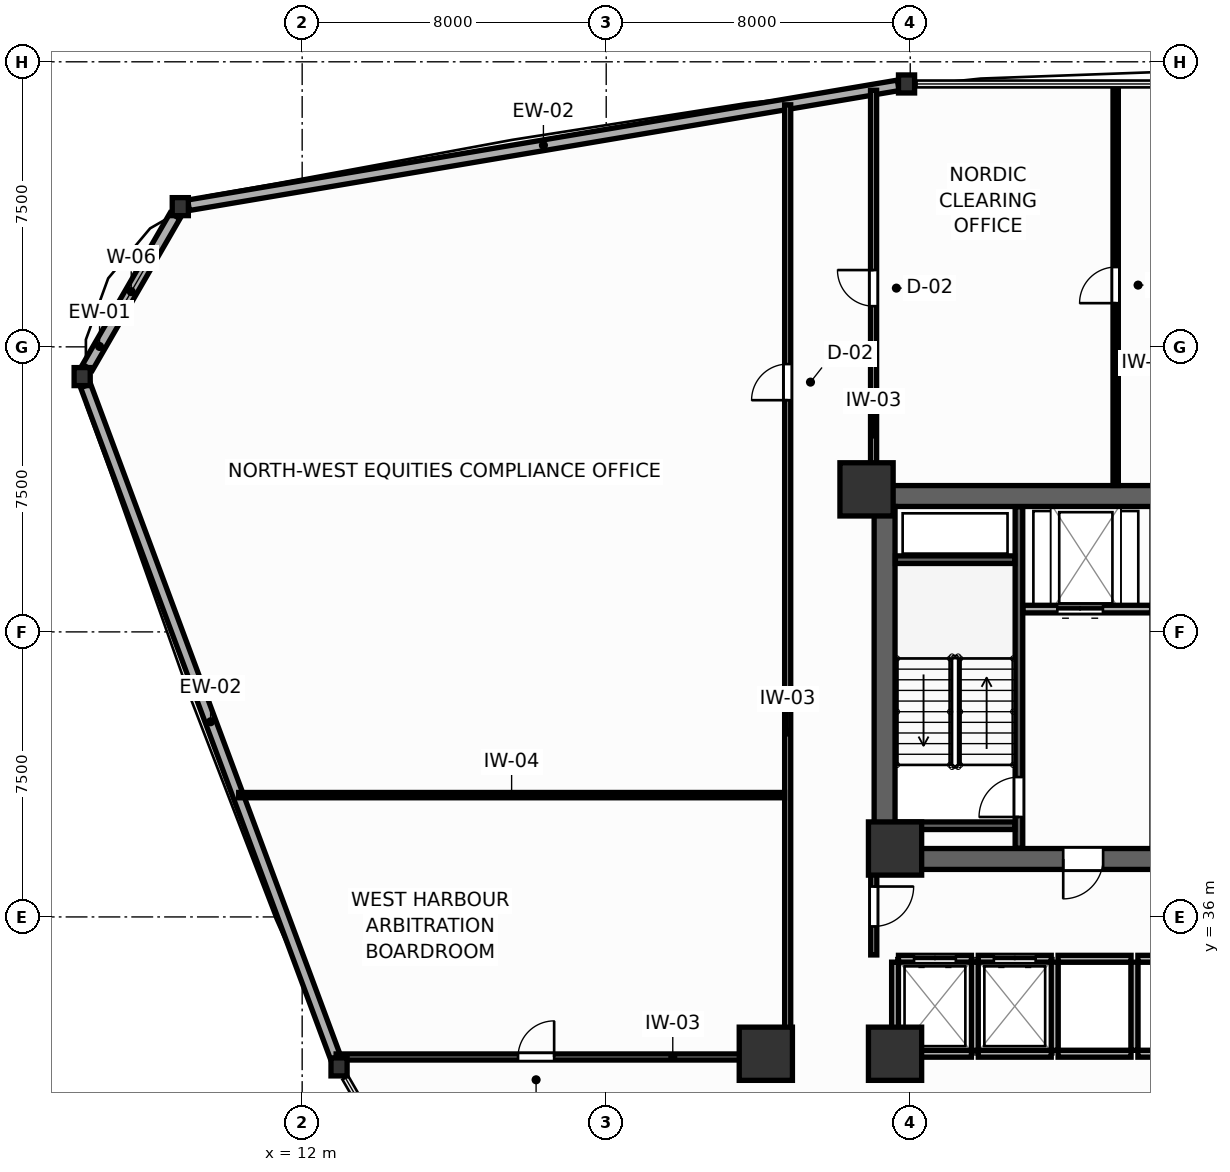
"""IFC4 building model, lengths in metres.
Left out: names, types, materials, properties, quantities, classifications, styles, units other than length and angle.
Written with IfcOpenShell. Run it as: python <this file> out.ifc"""

import sys

from ifc_helpers import new_model, si_unit, direction, frame, frame_2d, origin, origin_2d, place, context, subcontext, project, spatial, rectangle, i_section, extrude, source, transform, mapped, element, fill, save


model = new_model("IFC4")
c1 = context("Model", 3, precision=1e-05, world=origin(), true_north=direction((0.0, 1.0)))
c2 = subcontext(c1, "Body", "Model", "MODEL_VIEW")
j1 = project(units=[si_unit("LENGTHUNIT", "METRE"), si_unit("PLANEANGLEUNIT", "RADIAN")], contexts=[c1])
p1 = place(None, origin())
s1 = spatial("IfcSite", under=j1, at=p1, CompositionType="ELEMENT")
p2 = place(p1, origin())
s2 = spatial("IfcBuilding", under=s1, at=p2, CompositionType="ELEMENT")
p3 = place(p2, frame((0.0, 0.0, 31.8)))
s3 = spatial("IfcBuildingStorey", under=s2, at=p3, CompositionType="ELEMENT", Elevation=31.8)
p4 = place(p3, frame((27.05, 47.075, 0.0), z_axis=(0.0, 0.0, 1.0), x_axis=(1.0, 0.0, 0.0)))
e1 = element("IfcWall", 1, at=p4, inside=s3, PredefinedType="SHEAR", context=c2, shape_type="SweptSolid", body=[
    extrude(rectangle(XDim=17.9, YDim=0.55, at=frame_2d((8.95, 0.0))), origin(), (0.0, 0.0, 1.0), 3.9),
])
p5 = place(p3, frame((27.05, 37.525, 0.0), z_axis=(0.0, 0.0, 1.0), x_axis=(1.0, 0.0, 0.0)))
e2 = element("IfcWall", 2, at=p5, inside=s3, PredefinedType="SHEAR", context=c2, shape_type="SweptSolid", body=[
    extrude(rectangle(XDim=17.9, YDim=0.55, at=frame_2d((8.95, 0.0))), origin(), (0.0, 0.0, 1.0), 3.9),
])
p6 = place(p5, frame((4.975, 0.0, 0.0)))
e3 = element("IfcOpeningElement", 3, at=p6, cuts=e2, PredefinedType="OPENING", context=c2, shape_type="SweptSolid", body=[
    extrude(rectangle(XDim=1.05, YDim=2.1, at=frame_2d((0.525, 1.05))), frame((0.0, 0.285, 0.0), z_axis=(0.0, -1.0, 0.0), x_axis=(1.0, 0.0, 0.0)), (0.0, 0.0, 1.0), 0.57),
])
p7 = place(p5, frame((11.875, 0.0, 0.0)))
e4 = element("IfcOpeningElement", 4, at=p7, cuts=e2, PredefinedType="OPENING", context=c2, shape_type="SweptSolid", body=[
    extrude(rectangle(XDim=1.05, YDim=2.1, at=frame_2d((0.525, 1.05))), frame((0.0, 0.285, 0.0), z_axis=(0.0, -1.0, 0.0), x_axis=(1.0, 0.0, 0.0)), (0.0, 0.0, 1.0), 0.57),
])
p8 = place(p3, frame((27.325, 37.8, 0.0), z_axis=(0.0, 0.0, 1.0), x_axis=(0.0, 1.0, 0.0)))
e5 = element("IfcWall", 5, at=p8, inside=s3, PredefinedType="SHEAR", context=c2, shape_type="SweptSolid", body=[
    extrude(rectangle(XDim=9.0, YDim=0.55, at=frame_2d((4.5, 0.0))), origin(), (0.0, 0.0, 1.0), 3.9),
])
m1 = source(origin(), c2, "Body", "SweptSolid", [
    extrude(rectangle(XDim=1.4, YDim=1.4, at=origin_2d()), origin(), (0.0, 0.0, 1.0), 3.9),
])
for number, where, z_axis, x_axis in (
    (6, (26.85, 47.25, 0.0), (0.0, 0.0, 1.0), (1.0, 0.0, 0.0)),
    (7, (27.6, 37.8, 0.0), (0.0, 0.0, 1.0), (1.0, 0.0, 0.0)),
    (8, (27.6, 32.4, 0.0), (0.0, 0.0, 1.0), (1.0, 0.0, 0.0)),
    (9, (24.2, 32.4, 0.0), (0.0, 0.0, 1.0), (1.0, 0.0, 0.0)),
):
    element("IfcColumn", number, at=place(p3, frame(where, z_axis=z_axis, x_axis=x_axis)), inside=s3, PredefinedType="COLUMN", context=c2, shape_type="MappedRepresentation", body=[
        mapped(m1, transform((0.0, 0.0, 0.0), scale=1.0)),
    ])
m2 = source(origin(), c2, "Body", "SweptSolid", [
    extrude(i_section(OverallWidth=0.424, OverallDepth=0.474, WebThickness=0.045, FlangeThickness=0.072, FilletRadius=0.015, at=origin_2d()), origin(), (0.0, 0.0, 1.0), 3.9),
])
for number, where, z_axis, x_axis in (
    (10, (27.903, 57.917, 0.0), (0.0, 0.0, 1.0), (1.0, 0.0, 0.0)),
    (11, (8.793, 54.689, 0.0), (0.0, 0.0, 1.0), (1.0, 0.0, 0.0)),
    (12, (6.211, 50.217, 0.0), (0.0, 0.0, 1.0), (1.0, 0.0, 0.0)),
    (13, (12.97, 32.054, 0.0), (0.0, 0.0, 1.0), (1.0, 0.0, 0.0)),
):
    element("IfcColumn", number, at=place(p3, frame(where, z_axis=z_axis, x_axis=x_axis)), inside=s3, PredefinedType="COLUMN", context=c2, shape_type="MappedRepresentation", body=[
        mapped(m2, transform((0.0, 0.0, 0.0), scale=1.0)),
    ])
p9 = place(p3, frame((27.686, 57.88, 0.0), z_axis=(0.0, 0.0, 1.0), x_axis=(-0.98603202958, -0.166555806393, 0.0)))
e14 = element("IfcWall", 14, at=p9, inside=s3, PredefinedType="SOLIDWALL", context=c2, shape_type="SweptSolid", body=[
    extrude(rectangle(XDim=18.94, YDim=0.28, at=frame_2d((9.47, 0.0))), origin(), (0.0, 0.0, 1.0), 2.08),
])
p10 = place(p3, frame((8.654, 54.447, 0.0), z_axis=(0.0, 0.0, 1.0), x_axis=(-0.500022295776, -0.86601253093, 0.0)))
e15 = element("IfcWall", 15, at=p10, inside=s3, PredefinedType="SOLIDWALL", context=c2, shape_type="SweptSolid", body=[
    extrude(rectangle(XDim=4.605, YDim=0.3, at=frame_2d((2.302, 0.0))), origin(), (0.0, 0.0, 1.0), 2.08),
])
p11 = place(p10, frame((1.452, 0.0, 0.75)))
e16 = element("IfcOpeningElement", 16, at=p11, cuts=e15, PredefinedType="OPENING", context=c2, shape_type="SweptSolid", body=[
    extrude(rectangle(XDim=1.7, YDim=1.15, at=frame_2d((0.85, 0.575))), frame((0.0, 0.16, 0.0), z_axis=(0.0, -1.0, 0.0), x_axis=(1.0, 0.0, 0.0)), (0.0, 0.0, 1.0), 0.32),
])
p12 = place(p3, frame((6.302, 49.975, 0.0), z_axis=(0.0, 0.0, 1.0), x_axis=(0.348763587367, -0.937210734108, 0.0)))
e17 = element("IfcWall", 17, at=p12, inside=s3, PredefinedType="SOLIDWALL", context=c2, shape_type="SweptSolid", body=[
    extrude(rectangle(XDim=18.863, YDim=0.28, at=frame_2d((9.432, 0.0))), origin(), (0.0, 0.0, 1.0), 2.08),
])
p13 = place(p3, frame((30.86, 37.81, 0.0), z_axis=(0.0, 0.0, 1.0), x_axis=(0.0, 1.0, 0.0)))
e18 = element("IfcWall", 18, at=p13, inside=s3, PredefinedType="SHEAR", context=c2, shape_type="SweptSolid", body=[
    extrude(rectangle(XDim=8.98, YDim=0.2, at=frame_2d((4.49, 0.0))), origin(), (0.0, 0.0, 1.0), 3.9),
])
p14 = place(p13, frame((0.82, 0.0, 0.0)))
e19 = element("IfcOpeningElement", 19, at=p14, cuts=e18, PredefinedType="OPENING", context=c2, shape_type="SweptSolid", body=[
    extrude(rectangle(XDim=1.05, YDim=2.1, at=frame_2d((0.525, 1.05))), frame((0.0, 0.11, 0.0), z_axis=(0.0, -1.0, 0.0), x_axis=(1.0, 0.0, 0.0)), (0.0, 0.0, 1.0), 0.22),
])
for number, where, z_axis, x_axis in (
    (20, (27.61, 45.4, 0.0), (0.0, 0.0, 1.0), (1.0, 0.0, 0.0)),
    (21, (27.61, 38.4, 0.0), (0.0, 0.0, 1.0), (1.0, 0.0, 0.0)),
):
    element("IfcWall", number, at=place(p3, frame(where, z_axis=z_axis, x_axis=x_axis)), inside=s3, PredefinedType="SHEAR", context=c2, shape_type="SweptSolid", body=[
        extrude(rectangle(XDim=3.14, YDim=0.2, at=frame_2d((1.57, 0.0))), origin(), (0.0, 0.0, 1.0), 3.9),
    ])
p15 = place(p3, frame((30.97, 44.1, 0.0), z_axis=(0.0, 0.0, 1.0), x_axis=(1.0, 0.0, 0.0)))
e22 = element("IfcWall", 22, at=p15, inside=s3, PredefinedType="PARTITIONING", context=c2, shape_type="SweptSolid", body=[
    extrude(rectangle(XDim=3.38, YDim=0.2, at=frame_2d((1.69, 0.0))), origin(), (0.0, 0.0, 1.0), 3.68),
])
p16 = place(p15, frame((0.9, 0.0, 0.0)))
e23 = element("IfcOpeningElement", 23, at=p16, cuts=e22, PredefinedType="OPENING", context=c2, shape_type="SweptSolid", body=[
    extrude(rectangle(XDim=1.2, YDim=2.1, at=frame_2d((0.6, 1.05))), frame((0.0, 0.11, 0.0), z_axis=(0.0, -1.0, 0.0), x_axis=(1.0, 0.0, 0.0)), (0.0, 0.0, 1.0), 0.22),
])
p17 = place(p3, frame((27.69, 34.9, 0.0), z_axis=(0.0, 0.0, 1.0), x_axis=(1.0, 0.0, 0.0)))
e24 = element("IfcWall", 24, at=p17, inside=s3, PredefinedType="PARTITIONING", context=c2, shape_type="SweptSolid", body=[
    extrude(rectangle(XDim=1.92, YDim=0.18, at=frame_2d((0.96, 0.0))), origin(), (0.0, 0.0, 1.0), 3.68),
])
p18 = place(p17, frame((0.41, 0.0, 0.0)))
e25 = element("IfcOpeningElement", 25, at=p18, cuts=e24, PredefinedType="OPENING", context=c2, shape_type="SweptSolid", body=[
    extrude(rectangle(XDim=1.1, YDim=2.1, at=frame_2d((0.55, 1.05))), frame((0.0, 0.1, 0.0), z_axis=(0.0, -1.0, 0.0), x_axis=(1.0, 0.0, 0.0)), (0.0, 0.0, 1.0), 0.2),
])
p19 = place(p3, frame((27.69, 32.4, 0.0), z_axis=(0.0, 0.0, 1.0), x_axis=(1.0, 0.0, 0.0)))
e26 = element("IfcWall", 26, at=p19, inside=s3, PredefinedType="PARTITIONING", context=c2, shape_type="SweptSolid", body=[
    extrude(rectangle(XDim=1.92, YDim=0.18, at=frame_2d((0.96, 0.0))), origin(), (0.0, 0.0, 1.0), 2.24),
])
p20 = place(p3, frame((27.6, 32.49, 0.0), z_axis=(0.0, 0.0, 1.0), x_axis=(0.0, 1.0, 0.0)))
e27 = element("IfcWall", 27, at=p20, inside=s3, PredefinedType="PARTITIONING", context=c2, shape_type="SweptSolid", body=[
    extrude(rectangle(XDim=2.32, YDim=0.18, at=frame_2d((1.16, 0.0))), origin(), (0.0, 0.0, 1.0), 3.68),
])
p21 = place(p3, frame((29.79, 34.9, 0.0), z_axis=(0.0, 0.0, 1.0), x_axis=(1.0, 0.0, 0.0)))
e28 = element("IfcWall", 28, at=p21, inside=s3, PredefinedType="PARTITIONING", context=c2, shape_type="SweptSolid", body=[
    extrude(rectangle(XDim=1.92, YDim=0.18, at=frame_2d((0.96, 0.0))), origin(), (0.0, 0.0, 1.0), 3.68),
])
p22 = place(p21, frame((0.41, 0.0, 0.0)))
e29 = element("IfcOpeningElement", 29, at=p22, cuts=e28, PredefinedType="OPENING", context=c2, shape_type="SweptSolid", body=[
    extrude(rectangle(XDim=1.1, YDim=2.1, at=frame_2d((0.55, 1.05))), frame((0.0, 0.1, 0.0), z_axis=(0.0, -1.0, 0.0), x_axis=(1.0, 0.0, 0.0)), (0.0, 0.0, 1.0), 0.2),
])
p23 = place(p3, frame((29.79, 32.4, 0.0), z_axis=(0.0, 0.0, 1.0), x_axis=(1.0, 0.0, 0.0)))
e30 = element("IfcWall", 30, at=p23, inside=s3, PredefinedType="PARTITIONING", context=c2, shape_type="SweptSolid", body=[
    extrude(rectangle(XDim=1.92, YDim=0.18, at=frame_2d((0.96, 0.0))), origin(), (0.0, 0.0, 1.0), 2.24),
])
p24 = place(p3, frame((29.7, 32.49, 0.0), z_axis=(0.0, 0.0, 1.0), x_axis=(0.0, 1.0, 0.0)))
e31 = element("IfcWall", 31, at=p24, inside=s3, PredefinedType="PARTITIONING", context=c2, shape_type="SweptSolid", body=[
    extrude(rectangle(XDim=2.32, YDim=0.18, at=frame_2d((1.16, 0.0))), origin(), (0.0, 0.0, 1.0), 3.68),
])
p25 = place(p3, frame((31.89, 34.9, 0.0), z_axis=(0.0, 0.0, 1.0), x_axis=(1.0, 0.0, 0.0)))
e32 = element("IfcWall", 32, at=p25, inside=s3, PredefinedType="PARTITIONING", context=c2, shape_type="SweptSolid", body=[
    extrude(rectangle(XDim=1.92, YDim=0.18, at=frame_2d((0.96, 0.0))), origin(), (0.0, 0.0, 1.0), 3.68),
])
p26 = place(p3, frame((31.89, 32.4, 0.0), z_axis=(0.0, 0.0, 1.0), x_axis=(1.0, 0.0, 0.0)))
e33 = element("IfcWall", 33, at=p26, inside=s3, PredefinedType="PARTITIONING", context=c2, shape_type="SweptSolid", body=[
    extrude(rectangle(XDim=1.92, YDim=0.18, at=frame_2d((0.96, 0.0))), origin(), (0.0, 0.0, 1.0), 2.24),
])
p27 = place(p3, frame((31.8, 32.49, 0.0), z_axis=(0.0, 0.0, 1.0), x_axis=(0.0, 1.0, 0.0)))
e34 = element("IfcWall", 34, at=p27, inside=s3, PredefinedType="PARTITIONING", context=c2, shape_type="SweptSolid", body=[
    extrude(rectangle(XDim=2.32, YDim=0.18, at=frame_2d((1.16, 0.0))), origin(), (0.0, 0.0, 1.0), 3.68),
])
p28 = place(p3, frame((33.99, 34.9, 0.0), z_axis=(0.0, 0.0, 1.0), x_axis=(1.0, 0.0, 0.0)))
e35 = element("IfcWall", 35, at=p28, inside=s3, PredefinedType="PARTITIONING", context=c2, shape_type="SweptSolid", body=[
    extrude(rectangle(XDim=1.92, YDim=0.18, at=frame_2d((0.96, 0.0))), origin(), (0.0, 0.0, 1.0), 3.68),
])
p29 = place(p3, frame((33.99, 32.4, 0.0), z_axis=(0.0, 0.0, 1.0), x_axis=(1.0, 0.0, 0.0)))
e36 = element("IfcWall", 36, at=p29, inside=s3, PredefinedType="PARTITIONING", context=c2, shape_type="SweptSolid", body=[
    extrude(rectangle(XDim=1.92, YDim=0.18, at=frame_2d((0.96, 0.0))), origin(), (0.0, 0.0, 1.0), 2.24),
])
p30 = place(p3, frame((33.9, 32.49, 0.0), z_axis=(0.0, 0.0, 1.0), x_axis=(0.0, 1.0, 0.0)))
e37 = element("IfcWall", 37, at=p30, inside=s3, PredefinedType="PARTITIONING", context=c2, shape_type="SweptSolid", body=[
    extrude(rectangle(XDim=2.32, YDim=0.18, at=frame_2d((1.16, 0.0))), origin(), (0.0, 0.0, 1.0), 3.68),
])
p31 = place(p3, frame((27.04, 35.0, 0.0), z_axis=(0.0, 0.0, 1.0), x_axis=(0.0, 1.0, 0.0)))
e38 = element("IfcWall", 38, at=p31, inside=s3, PredefinedType="PARTITIONING", context=c2, shape_type="SweptSolid", body=[
    extrude(rectangle(XDim=2.65, YDim=0.16, at=frame_2d((1.325, 0.0))), origin(), (0.0, 0.0, 1.0), 3.68),
])
p32 = place(p31, frame((0.75, 0.0, 0.0)))
e39 = element("IfcOpeningElement", 39, at=p32, cuts=e38, PredefinedType="OPENING", context=c2, shape_type="SweptSolid", body=[
    extrude(rectangle(XDim=1.05, YDim=2.1, at=frame_2d((0.525, 1.05))), frame((0.0, 0.09, 0.0), z_axis=(0.0, -1.0, 0.0), x_axis=(1.0, 0.0, 0.0)), (0.0, 0.0, 1.0), 0.18),
])
p33 = place(p3, frame((24.775, 32.31, 0.0), z_axis=(0.0, 0.0, 1.0), x_axis=(0.0, 1.0, 0.0)))
e40 = element("IfcWall", 40, at=p33, inside=s3, PredefinedType="PARTITIONING", context=c2, shape_type="SweptSolid", body=[
    extrude(rectangle(XDim=25.059, YDim=0.16, at=frame_2d((12.529, 0.0))), origin(), (0.0, 0.0, 1.0), 3.68),
])
p34 = place(p33, frame((17.287, 0.0, 0.0)))
e41 = element("IfcOpeningElement", 41, at=p34, cuts=e40, PredefinedType="OPENING", context=c2, shape_type="SweptSolid", body=[
    extrude(rectangle(XDim=0.95, YDim=2.05, at=frame_2d((0.475, 1.025))), frame((0.0, 0.09, 0.0), z_axis=(0.0, -1.0, 0.0), x_axis=(1.0, 0.0, 0.0)), (0.0, 0.0, 1.0), 0.18),
])
p35 = place(p3, frame((12.893, 32.315, 0.0), z_axis=(0.0, 0.0, 1.0), x_axis=(1.0, 0.0, 0.0)))
e42 = element("IfcWall", 42, at=p35, inside=s3, PredefinedType="PARTITIONING", context=c2, shape_type="SweptSolid", body=[
    extrude(rectangle(XDim=11.8, YDim=0.16, at=frame_2d((5.9, 0.0))), origin(), (0.0, 0.0, 1.0), 2.24),
])
p36 = place(p35, frame((4.787, 0.0, 0.0)))
e43 = element("IfcOpeningElement", 43, at=p36, cuts=e42, PredefinedType="OPENING", context=c2, shape_type="SweptSolid", body=[
    extrude(rectangle(XDim=0.95, YDim=2.05, at=frame_2d((0.475, 1.025))), frame((0.0, 0.09, 0.0), z_axis=(0.0, -1.0, 0.0), x_axis=(1.0, 0.0, 0.0)), (0.0, 0.0, 1.0), 0.18),
])
p37 = place(p3, frame((27.035, 47.34, 0.0), z_axis=(0.0, 0.0, 1.0), x_axis=(0.0, 1.0, 0.0)))
e44 = element("IfcWall", 44, at=p37, inside=s3, PredefinedType="PARTITIONING", context=c2, shape_type="SweptSolid", body=[
    extrude(rectangle(XDim=10.41, YDim=0.16, at=frame_2d((5.205, 0.0))), origin(), (0.0, 0.0, 1.0), 2.24),
])
p38 = place(p37, frame((4.73, 0.0, 0.0)))
e45 = element("IfcOpeningElement", 45, at=p38, cuts=e44, PredefinedType="OPENING", context=c2, shape_type="SweptSolid", body=[
    extrude(rectangle(XDim=0.95, YDim=2.05, at=frame_2d((0.475, 1.025))), frame((0.0, 0.09, 0.0), z_axis=(0.0, -1.0, 0.0), x_axis=(1.0, 0.0, 0.0)), (0.0, 0.0, 1.0), 0.18),
])
p39 = place(p3, frame((10.329, 39.205, 0.0), z_axis=(0.0, 0.0, 1.0), x_axis=(1.0, 0.0, 0.0)))
e46 = element("IfcWall", 46, at=p39, inside=s3, PredefinedType="PARTITIONING", context=c2, shape_type="SweptSolid", body=[
    extrude(rectangle(XDim=14.364, YDim=0.14, at=frame_2d((7.182, 0.0))), origin(), (0.0, 0.0, 1.0), 3.68),
])
p40 = place(p3, frame((33.405, 47.352, 0.0), z_axis=(0.0, 0.0, 1.0), x_axis=(0.0, 1.0, 0.0)))
e47 = element("IfcWall", 47, at=p40, inside=s3, PredefinedType="PARTITIONING", context=c2, shape_type="SweptSolid", body=[
    extrude(rectangle(XDim=10.545, YDim=0.14, at=frame_2d((5.272, 0.0))), origin(), (0.0, 0.0, 1.0), 3.68),
])
p41 = place(p40, frame((4.798, 0.0, 0.0)))
e48 = element("IfcOpeningElement", 48, at=p41, cuts=e47, PredefinedType="OPENING", context=c2, shape_type="SweptSolid", body=[
    extrude(rectangle(XDim=0.95, YDim=2.05, at=frame_2d((0.475, 1.025))), frame((0.0, 0.08, 0.0), z_axis=(0.0, -1.0, 0.0), x_axis=(1.0, 0.0, 0.0)), (0.0, 0.0, 1.0), 0.16),
])
p42 = place(p11, origin())
e49 = element("IfcWindow", 49, at=p42, inside=s3, PartitioningType="SINGLE_PANEL", PredefinedType="WINDOW", context=c2, shape_type="SweptSolid", body=[
    extrude(rectangle(XDim=1.7, YDim=1.15, at=frame_2d((0.85, 0.575))), frame((0.0, 0.03, 0.0), z_axis=(0.0, -1.0, 0.0), x_axis=(1.0, 0.0, 0.0)), (0.0, 0.0, 1.0), 0.06),
])
fill(e16, e49)
p43 = place(p14, origin())
e50 = element("IfcDoor", 50, at=p43, inside=s3, OperationType="SINGLE_SWING_LEFT", PredefinedType="DOOR", context=c2, shape_type="SweptSolid", body=[
    extrude(rectangle(XDim=1.05, YDim=2.1, at=frame_2d((0.525, 1.05))), frame((0.0, 0.025, 0.0), z_axis=(0.0, -1.0, 0.0), x_axis=(1.0, 0.0, 0.0)), (0.0, 0.0, 1.0), 0.05),
])
fill(e19, e50)
p44 = place(p16, origin())
e51 = element("IfcDoor", 51, at=p44, inside=s3, OperationType="DOUBLE_DOOR_SLIDING", PredefinedType="DOOR", context=c2, shape_type="SweptSolid", body=[
    extrude(rectangle(XDim=1.2, YDim=2.1, at=frame_2d((0.6, 1.05))), frame((0.0, 0.025, 0.0), z_axis=(0.0, -1.0, 0.0), x_axis=(1.0, 0.0, 0.0)), (0.0, 0.0, 1.0), 0.05),
])
fill(e23, e51)
p45 = place(p18, origin())
e52 = element("IfcDoor", 52, at=p45, inside=s3, OperationType="DOUBLE_DOOR_SLIDING", PredefinedType="DOOR", context=c2, shape_type="SweptSolid", body=[
    extrude(rectangle(XDim=1.1, YDim=2.1, at=frame_2d((0.55, 1.05))), frame((0.0, 0.025, 0.0), z_axis=(0.0, -1.0, 0.0), x_axis=(1.0, 0.0, 0.0)), (0.0, 0.0, 1.0), 0.05),
])
fill(e25, e52)
p46 = place(p22, origin())
e53 = element("IfcDoor", 53, at=p46, inside=s3, OperationType="DOUBLE_DOOR_SLIDING", PredefinedType="DOOR", context=c2, shape_type="SweptSolid", body=[
    extrude(rectangle(XDim=1.1, YDim=2.1, at=frame_2d((0.55, 1.05))), frame((0.0, 0.025, 0.0), z_axis=(0.0, -1.0, 0.0), x_axis=(1.0, 0.0, 0.0)), (0.0, 0.0, 1.0), 0.05),
])
fill(e29, e53)
p47 = place(p32, frame((1.05, 0.0, 0.0), z_axis=(0.0, 0.0, 1.0), x_axis=(-1.0, 0.0, 0.0)))
e54 = element("IfcDoor", 54, at=p47, inside=s3, OperationType="SINGLE_SWING_LEFT", PredefinedType="DOOR", context=c2, shape_type="SweptSolid", body=[
    extrude(rectangle(XDim=1.05, YDim=2.1, at=frame_2d((0.525, 1.05))), frame((0.0, 0.025, 0.0), z_axis=(0.0, -1.0, 0.0), x_axis=(1.0, 0.0, 0.0)), (0.0, 0.0, 1.0), 0.05),
])
fill(e39, e54)
p48 = place(p34, origin())
e55 = element("IfcDoor", 55, at=p48, inside=s3, OperationType="SINGLE_SWING_LEFT", PredefinedType="DOOR", context=c2, shape_type="SweptSolid", body=[
    extrude(rectangle(XDim=0.95, YDim=2.05, at=frame_2d((0.475, 1.025))), frame((0.0, 0.025, 0.0), z_axis=(0.0, -1.0, 0.0), x_axis=(1.0, 0.0, 0.0)), (0.0, 0.0, 1.0), 0.05),
])
fill(e41, e55)
p49 = place(p36, origin())
e56 = element("IfcDoor", 56, at=p49, inside=s3, OperationType="SINGLE_SWING_RIGHT", PredefinedType="DOOR", context=c2, shape_type="SweptSolid", body=[
    extrude(rectangle(XDim=0.95, YDim=2.05, at=frame_2d((0.475, 1.025))), frame((0.0, 0.025, 0.0), z_axis=(0.0, -1.0, 0.0), x_axis=(1.0, 0.0, 0.0)), (0.0, 0.0, 1.0), 0.05),
])
fill(e43, e56)
p50 = place(p38, origin())
e57 = element("IfcDoor", 57, at=p50, inside=s3, OperationType="SINGLE_SWING_RIGHT", PredefinedType="DOOR", context=c2, shape_type="SweptSolid", body=[
    extrude(rectangle(XDim=0.95, YDim=2.05, at=frame_2d((0.475, 1.025))), frame((0.0, 0.025, 0.0), z_axis=(0.0, -1.0, 0.0), x_axis=(1.0, 0.0, 0.0)), (0.0, 0.0, 1.0), 0.05),
])
fill(e45, e57)
p51 = place(p41, origin())
e58 = element("IfcDoor", 58, at=p51, inside=s3, OperationType="SINGLE_SWING_LEFT", PredefinedType="DOOR", context=c2, shape_type="SweptSolid", body=[
    extrude(rectangle(XDim=0.95, YDim=2.05, at=frame_2d((0.475, 1.025))), frame((0.0, 0.025, 0.0), z_axis=(0.0, -1.0, 0.0), x_axis=(1.0, 0.0, 0.0)), (0.0, 0.0, 1.0), 0.05),
])
fill(e48, e58)
p52 = place(p6, frame((1.05, 0.0, 0.0), z_axis=(0.0, 0.0, 1.0), x_axis=(-1.0, 0.0, 0.0)))
e59 = element("IfcDoor", 59, at=p52, inside=s3, OperationType="SINGLE_SWING_RIGHT", PredefinedType="DOOR", context=c2, shape_type="SweptSolid", body=[
    extrude(rectangle(XDim=1.05, YDim=2.1, at=frame_2d((0.525, 1.05))), frame((0.0, 0.025, 0.0), z_axis=(0.0, -1.0, 0.0), x_axis=(1.0, 0.0, 0.0)), (0.0, 0.0, 1.0), 0.05),
])
fill(e3, e59)
save(model, sys.argv[1])
